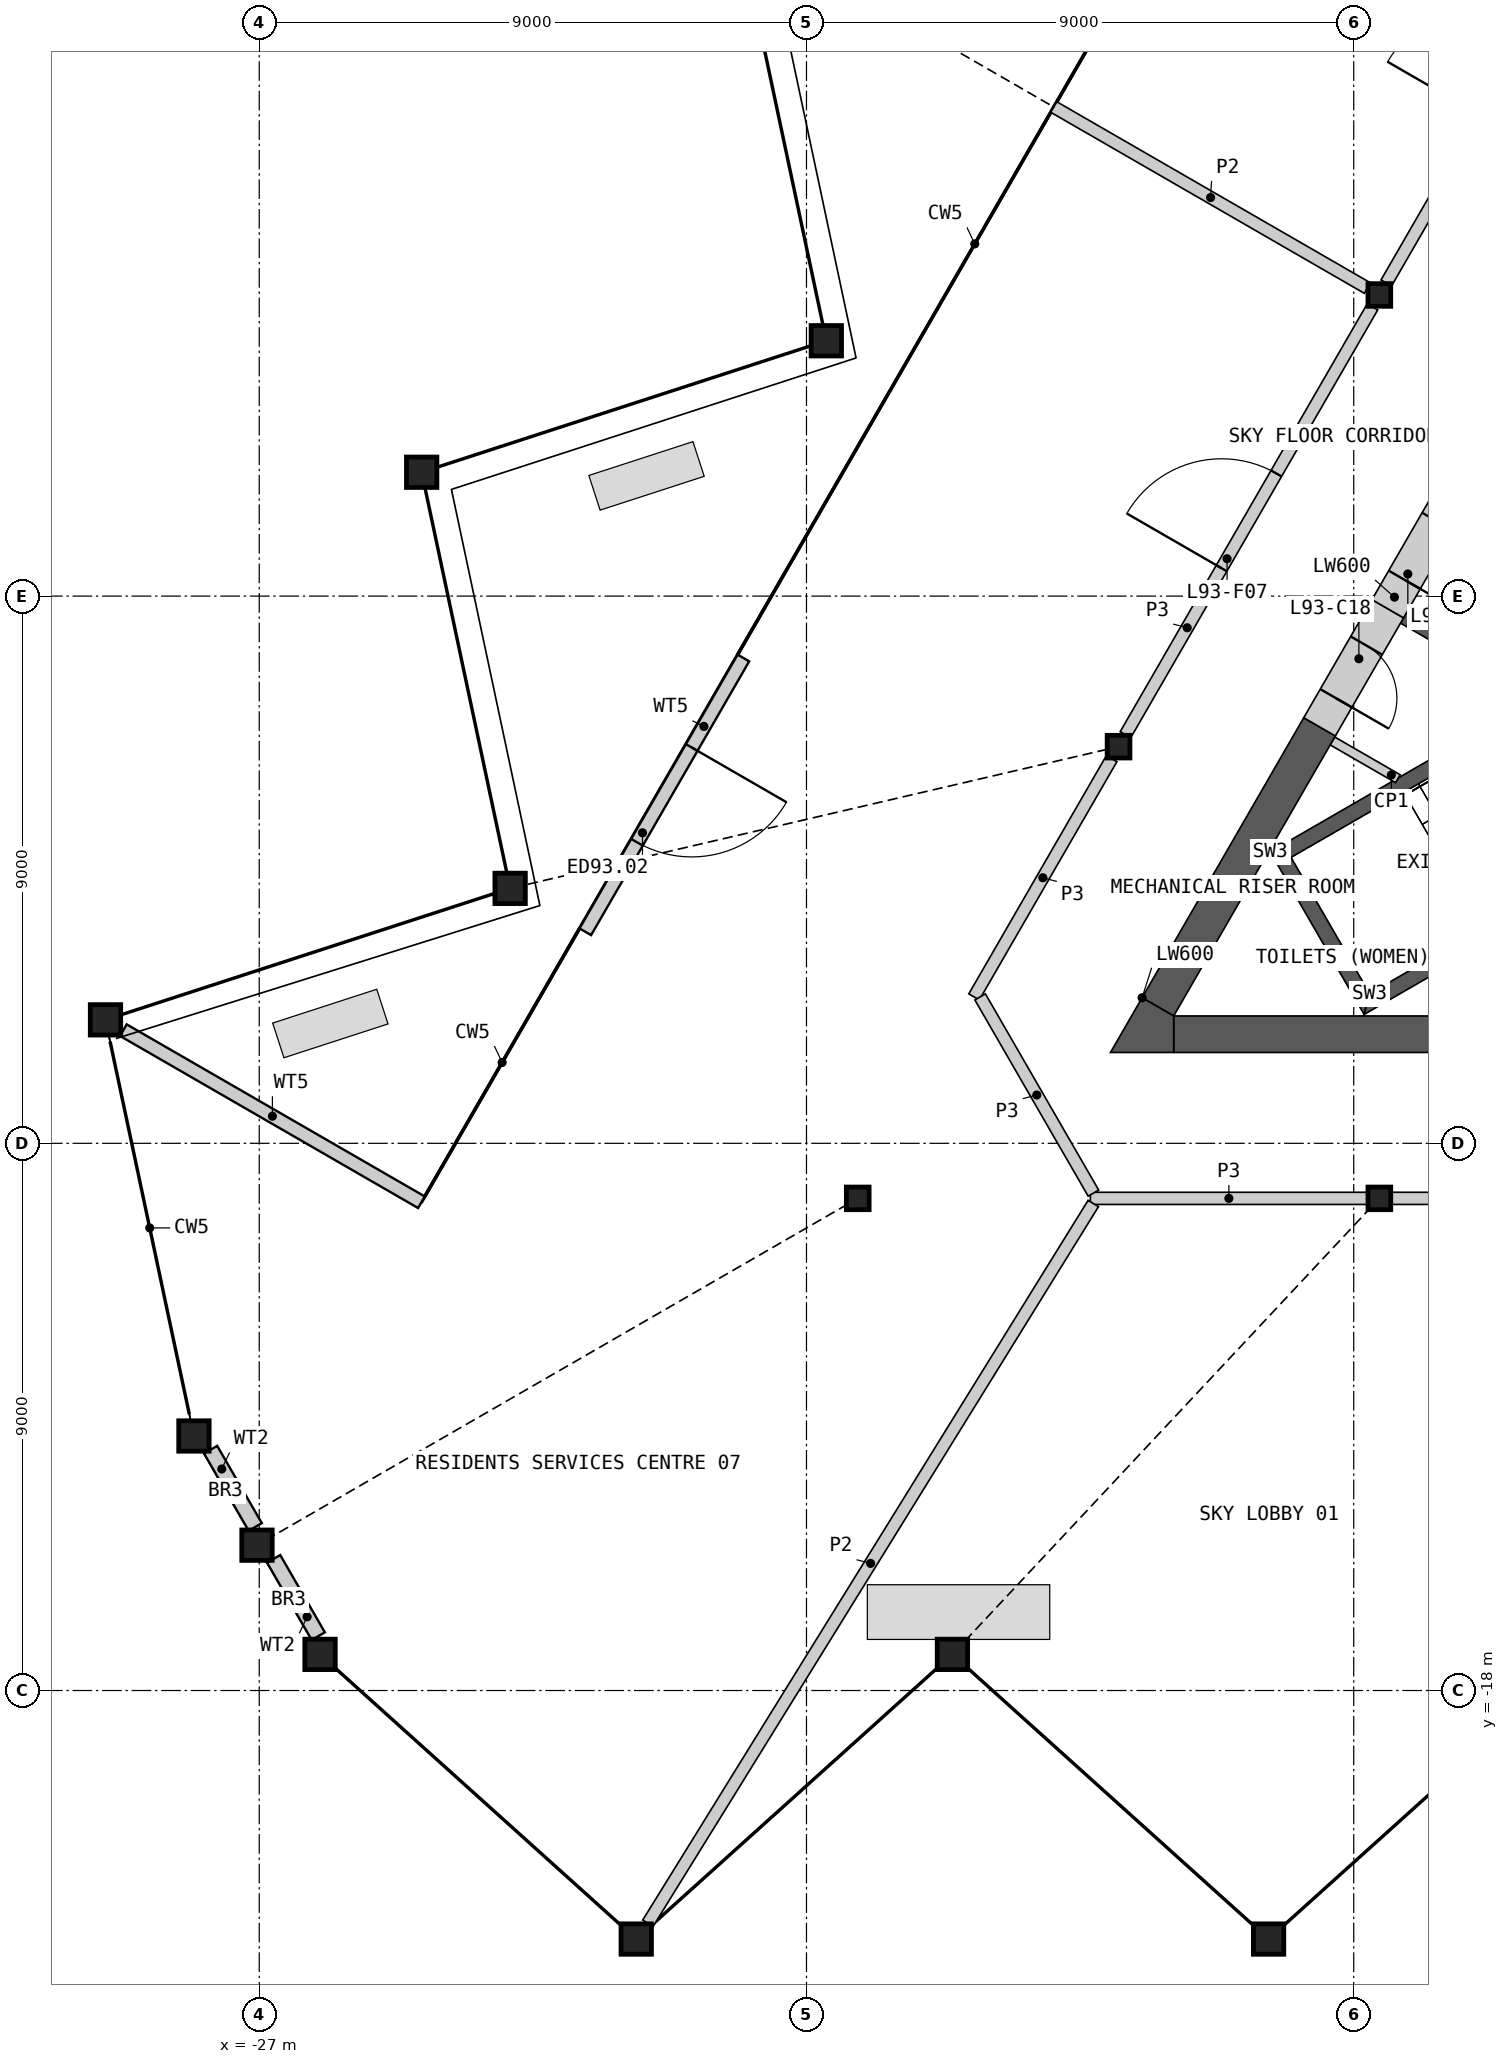
"""IFC4 building model, lengths in metres.
Left out: names, types, materials, properties, quantities, classifications, styles, units other than length and angle.
Written with IfcOpenShell. Run it as: python <this file> out.ifc"""

import sys

from ifc_helpers import new_model, si_unit, direction, frame, frame_2d, origin, origin_2d, place, context, subcontext, project, spatial, polyline, rectangle, hollow_rectangle, i_section, outline, extrude, element, fill, save


model = new_model("IFC4")
c1 = context("Model", 3, precision=1e-05, world=origin(), true_north=direction((0.0, 1.0)))
c2 = subcontext(c1, "Body", "Model", "MODEL_VIEW")
j1 = project(units=[si_unit("LENGTHUNIT", "METRE"), si_unit("PLANEANGLEUNIT", "RADIAN")], contexts=[c1])
p1 = place(None, origin())
s1 = spatial("IfcSite", under=j1, at=p1, CompositionType="ELEMENT")
p2 = place(p1, origin())
s2 = spatial("IfcBuilding", under=s1, at=p2, CompositionType="ELEMENT")
p3 = place(p2, frame((0.0, 0.0, 405.2)))
s3 = spatial("IfcBuildingStorey", under=s2, at=p3, CompositionType="ELEMENT", Elevation=405.2)
for number, where, z_axis, x_axis in (
    (1, (-26.0, -17.406, 0.0), (0.0, 0.0, 1.0), (1.0, 0.0, 0.0)),
    (2, (-20.8, -22.088, 0.0), (0.0, 0.0, 1.0), (1.0, 0.0, 0.0)),
    (3, (-15.6, -17.406, 0.0), (0.0, 0.0, 1.0), (1.0, 0.0, 0.0)),
    (4, (-10.4, -22.088, 0.0), (0.0, 0.0, 1.0), (1.0, 0.0, 0.0)),
    (5, (-17.674, 4.199, 0.0), (0.0, 0.0, 1.0), (1.0, 0.0, 0.0)),
    (6, (-24.329, 2.037, 0.0), (0.0, 0.0, 1.0), (1.0, 0.0, 0.0)),
    (7, (-22.874, -4.807, 0.0), (0.0, 0.0, 1.0), (1.0, 0.0, 0.0)),
    (8, (-29.529, -6.969, 0.0), (0.0, 0.0, 1.0), (1.0, 0.0, 0.0)),
    (9, (-28.074, -13.814, 0.0), (0.0, 0.0, 1.0), (1.0, 0.0, 0.0)),
    (10, (-27.037, -15.61, 0.0), (0.0, 0.0, 1.0), (1.0, 0.0, 0.0)),
):
    element("IfcColumn", number, at=place(p3, frame(where, z_axis=z_axis, x_axis=x_axis)), inside=s3, PredefinedType="COLUMN", context=c2, shape_type="SweptSolid", body=[
        extrude(hollow_rectangle(XDim=0.5, YDim=0.5, WallThickness=0.03, at=origin_2d()), origin(), (0.0, 0.0, 1.0), 10.0),
    ])
for number, where, z_axis, x_axis in (
    (11, (-8.578, 4.953, 0.0), (0.0, 0.0, 1.0), (1.0, 0.0, 0.0)),
    (12, (-12.868, -2.476, 0.0), (0.0, 0.0, 1.0), (1.0, 0.0, 0.0)),
    (13, (-17.157, -9.906, 0.0), (0.0, 0.0, 1.0), (1.0, 0.0, 0.0)),
    (14, (-8.578, -9.906, 0.0), (0.0, 0.0, 1.0), (1.0, 0.0, 0.0)),
):
    element("IfcColumn", number, at=place(p3, frame(where, z_axis=z_axis, x_axis=x_axis)), inside=s3, PredefinedType="COLUMN", context=c2, shape_type="SweptSolid", body=[
        extrude(i_section(OverallWidth=0.374, OverallDepth=0.372, WebThickness=0.016, FlangeThickness=0.026, at=origin_2d()), origin(), (0.0, 0.0, 1.0), 10.0),
    ])
for number, where, z_axis, x_axis in (
    (15, (-27.8, -14.039, 0.0), (0.0, 0.0, 1.0), (0.5, -0.866, 0.0)),
    (16, (-26.763, -15.835, 0.0), (0.0, 0.0, 1.0), (0.5, -0.866, 0.0)),
):
    element("IfcWall", number, at=place(p3, frame(where, z_axis=z_axis, x_axis=x_axis)), inside=s3, PredefinedType="SOLIDWALL", context=c2, shape_type="SweptSolid", body=[
        extrude(rectangle(XDim=1.468, YDim=0.25, at=frame_2d((0.734, 0.0))), origin(), (0.0, 0.0, 1.0), 9.234),
    ])
p4 = place(p3, frame((-19.037, -1.018, 0.0), z_axis=(0.0, 0.0, 1.0), x_axis=(-0.500027264788, -0.866009661879, 0.0)))
e17 = element("IfcWall", 17, at=p4, inside=s3, PredefinedType="SOLIDWALL", context=c2, shape_type="SweptSolid", body=[
    extrude(rectangle(XDim=5.2, YDim=0.22, at=frame_2d((2.6, 0.0))), origin(), (0.0, 0.0, 1.0), 9.234),
])
p5 = place(p4, frame((1.7, 0.0, 0.0)))
e18 = element("IfcOpeningElement", 18, at=p5, cuts=e17, PredefinedType="OPENING", context=c2, shape_type="SweptSolid", body=[
    extrude(rectangle(XDim=1.8, YDim=2.4, at=frame_2d((0.9, 1.2))), frame((0.0, 0.12, 0.0), z_axis=(0.0, -1.0, 0.0), x_axis=(1.0, 0.0, 0.0)), (0.0, 0.0, 1.0), 0.24),
])
p6 = place(p3, frame((-29.235, -7.139, 0.0), z_axis=(0.0, 0.0, 1.0), x_axis=(0.866018233111, -0.500012419765, 0.0)))
e19 = element("IfcWall", 19, at=p6, inside=s3, PredefinedType="SOLIDWALL", context=c2, shape_type="SweptSolid", body=[
    extrude(rectangle(XDim=5.66, YDim=0.22, at=frame_2d((2.83, 0.0))), origin(), (0.0, 0.0, 1.0), 9.234),
])
p7 = place(p3, origin())
e20 = element("IfcWall", 20, at=p7, inside=s3, PredefinedType="SHEAR", context=c2, shape_type="SweptSolid", body=[
    extrude(outline(polyline([(-6.061, -1.697), (-8.231, -0.444), (-8.131, -0.271), (-5.96, -1.524), (-6.061, -1.697)])), origin(), (0.0, 0.0, 1.0), 9.7),
])
p8 = place(p3, origin())
e21 = element("IfcWall", 21, at=p8, inside=s3, PredefinedType="SHEAR", context=c2, shape_type="SweptSolid", body=[
    extrude(outline(polyline([(-5.307, -1.281), (-10.374, -4.206), (-10.032, -4.298), (-5.182, -1.498), (-5.307, -1.281)])), origin(), (0.0, 0.0, 1.0), 9.7),
])
p9 = place(p3, origin())
e22 = element("IfcWall", 22, at=p9, inside=s3, PredefinedType="SHEAR", context=c2, shape_type="SweptSolid", body=[
    extrude(outline(polyline([(-10.374, -4.206), (-8.83, -6.881), (-8.738, -6.539), (-10.032, -4.298), (-10.374, -4.206)])), origin(), (0.0, 0.0, 1.0), 9.7),
])
p10 = place(p3, origin())
e23 = element("IfcWall", 23, at=p10, inside=s3, PredefinedType="SHEAR", context=c2, shape_type="SweptSolid", body=[
    extrude(outline(polyline([(-8.738, -6.539), (-8.83, -6.881), (-3.763, -3.956), (-3.888, -3.739), (-8.738, -6.539)])), origin(), (0.0, 0.0, 1.0), 9.7),
])
p11 = place(p3, frame((-9.35, -2.383, 0.0), z_axis=(0.0, 0.0, 1.0), x_axis=(0.866057962423, -0.499943602543, 0.0)))
e24 = element("IfcWall", 24, at=p11, inside=s3, PredefinedType="PARTITIONING", context=c2, shape_type="SweptSolid", body=[
    extrude(rectangle(XDim=1.242, YDim=0.15, at=frame_2d((0.621, 0.0))), origin(), (0.0, 0.0, 1.0), 9.7),
])
p12 = place(p3, frame((-11.961, -7.206, 0.0), z_axis=(0.0, 0.0, 1.0), x_axis=(1.0, 0.0, 0.0)))
e25 = element("IfcWall", 25, at=p12, inside=s3, PredefinedType="SHEAR", context=c2, shape_type="SweptSolid", body=[
    extrude(rectangle(XDim=4.868, YDim=0.6, at=frame_2d((2.434, 0.0))), origin(), (0.0, 0.0, 1.0), 9.7),
])
p13 = place(p3, frame((-9.562, -2.15, 0.0), z_axis=(0.0, 0.0, 1.0), x_axis=(-0.500015214976, -0.866016619236, 0.0)))
e26 = element("IfcWall", 26, at=p13, inside=s3, PredefinedType="SHEAR", context=c2, shape_type="SweptSolid", body=[
    extrude(rectangle(XDim=5.318, YDim=0.6, at=frame_2d((2.659, 0.0))), origin(), (0.0, 0.0, 1.0), 9.7),
])
p14 = place(p3, origin())
e27 = element("IfcWall", 27, at=p14, inside=s3, PredefinedType="SHEAR", context=c2, shape_type="SweptSolid", body=[
    extrude(outline(polyline([(-12.48, -6.606), (-11.961, -6.906), (-11.961, -7.506), (-13.0, -7.506), (-12.48, -6.606)])), origin(), (0.0, 0.0, 1.0), 9.7),
])
p15 = place(p3, frame((-8.44, -0.208, 0.0), z_axis=(0.0, 0.0, 1.0), x_axis=(-0.500001951578, -0.866024277037, 0.0)))
e28 = element("IfcWall", 28, at=p15, inside=s3, PredefinedType="SHEAR", context=c2, shape_type="SweptSolid", body=[
    extrude(rectangle(XDim=2.243, YDim=0.6, at=frame_2d((1.122, 0.0))), origin(), (0.0, 0.0, 1.0), 9.7),
])
p16 = place(p15, frame((0.7, 0.0, 0.0)))
e29 = element("IfcOpeningElement", 29, at=p16, cuts=e28, PredefinedType="OPENING", context=c2, shape_type="SweptSolid", body=[
    extrude(rectangle(XDim=1.0, YDim=2.1, at=frame_2d((0.5, 1.05))), frame((0.0, 0.31, 0.0), z_axis=(0.0, -1.0, 0.0), x_axis=(1.0, 0.0, 0.0)), (0.0, 0.0, 1.0), 0.62),
])
p17 = place(p3, frame((-7.34, 1.698, 0.0), z_axis=(0.0, 0.0, 1.0), x_axis=(-0.50002983664, -0.866008176907, 0.0)))
e30 = element("IfcWall", 30, at=p17, inside=s3, PredefinedType="SHEAR", context=c2, shape_type="SweptSolid", body=[
    extrude(rectangle(XDim=2.2, YDim=0.6, at=frame_2d((1.1, 0.0))), origin(), (0.0, 0.0, 1.0), 9.7),
])
p18 = place(p17, frame((0.55, 0.0, 0.0)))
e31 = element("IfcOpeningElement", 31, at=p18, cuts=e30, PredefinedType="OPENING", context=c2, shape_type="SweptSolid", body=[
    extrude(rectangle(XDim=1.1, YDim=2.1, at=frame_2d((0.55, 1.05))), frame((0.0, 0.31, 0.0), z_axis=(0.0, -1.0, 0.0), x_axis=(1.0, 0.0, 0.0)), (0.0, 0.0, 1.0), 0.62),
])
p19 = place(p3, frame((-8.382, -9.906, 0.0), z_axis=(0.0, 0.0, 1.0), x_axis=(1.0, 0.0, 0.0)))
e32 = element("IfcWall", 32, at=p19, inside=s3, PredefinedType="PARTITIONING", context=c2, shape_type="SweptSolid", body=[
    extrude(rectangle(XDim=8.185, YDim=0.2, at=frame_2d((4.092, 0.0))), origin(), (0.0, 0.0, 1.0), 9.7),
])
p20 = place(p19, frame((3.192, 0.0, 0.0)))
e33 = element("IfcOpeningElement", 33, at=p20, cuts=e32, PredefinedType="OPENING", context=c2, shape_type="SweptSolid", body=[
    extrude(rectangle(XDim=1.8, YDim=2.1, at=frame_2d((0.9, 1.05))), frame((0.0, 0.11, 0.0), z_axis=(0.0, -1.0, 0.0), x_axis=(1.0, 0.0, 0.0)), (0.0, 0.0, 1.0), 0.22),
])
p21 = place(p3, frame((-8.465, 5.15, 0.0), z_axis=(0.0, 0.0, 1.0), x_axis=(0.499992155518, 0.866029932751, 0.0)))
e34 = element("IfcWall", 34, at=p21, inside=s3, PredefinedType="PARTITIONING", context=c2, shape_type="SweptSolid", body=[
    extrude(rectangle(XDim=8.123, YDim=0.2, at=frame_2d((4.062, 0.0))), origin(), (0.0, 0.0, 1.0), 9.7),
])
p22 = place(p21, frame((3.162, 0.0, 0.0)))
e35 = element("IfcOpeningElement", 35, at=p22, cuts=e34, PredefinedType="OPENING", context=c2, shape_type="SweptSolid", body=[
    extrude(rectangle(XDim=1.8, YDim=2.1, at=frame_2d((0.9, 1.05))), frame((0.0, 0.11, 0.0), z_axis=(0.0, -1.0, 0.0), x_axis=(1.0, 0.0, 0.0)), (0.0, 0.0, 1.0), 0.22),
])
p23 = place(p3, frame((-12.754, -2.279, 0.0), z_axis=(0.0, 0.0, 1.0), x_axis=(0.500001682468, 0.866024432409, 0.0)))
e36 = element("IfcWall", 36, at=p23, inside=s3, PredefinedType="PARTITIONING", context=c2, shape_type="SweptSolid", body=[
    extrude(rectangle(XDim=8.124, YDim=0.2, at=frame_2d((4.062, 0.0))), origin(), (0.0, 0.0, 1.0), 9.7),
])
p24 = place(p23, frame((3.162, 0.0, 0.0)))
e37 = element("IfcOpeningElement", 37, at=p24, cuts=e36, PredefinedType="OPENING", context=c2, shape_type="SweptSolid", body=[
    extrude(rectangle(XDim=1.8, YDim=2.1, at=frame_2d((0.9, 1.05))), frame((0.0, 0.11, 0.0), z_axis=(0.0, -1.0, 0.0), x_axis=(1.0, 0.0, 0.0)), (0.0, 0.0, 1.0), 0.22),
])
p25 = place(p3, frame((-13.331, -9.906, 0.0), z_axis=(0.0, 0.0, 1.0), x_axis=(1.0, 0.0, 0.0)))
e38 = element("IfcWall", 38, at=p25, inside=s3, PredefinedType="PARTITIONING", context=c2, shape_type="SweptSolid", body=[
    extrude(rectangle(XDim=4.555, YDim=0.2, at=frame_2d((2.278, 0.0))), origin(), (0.0, 0.0, 1.0), 9.7),
])
p26 = place(p3, frame((-15.244, -6.592, 0.0), z_axis=(0.0, 0.0, 1.0), x_axis=(0.499974648164, 0.866040040179, 0.0)))
e39 = element("IfcWall", 39, at=p26, inside=s3, PredefinedType="PARTITIONING", context=c2, shape_type="SweptSolid", body=[
    extrude(rectangle(XDim=4.525, YDim=0.2, at=frame_2d((2.263, 0.0))), origin(), (0.0, 0.0, 1.0), 9.7),
])
p27 = place(p3, frame((-15.144, -6.592, 0.0), z_axis=(0.0, 0.0, 1.0), x_axis=(0.499958791762, -0.866049194065, 0.0)))
e40 = element("IfcWall", 40, at=p27, inside=s3, PredefinedType="PARTITIONING", context=c2, shape_type="SweptSolid", body=[
    extrude(rectangle(XDim=3.726, YDim=0.2, at=frame_2d((1.863, 0.0))), origin(), (0.0, 0.0, 1.0), 9.7),
])
p28 = place(p3, frame((-20.608, -21.828, 0.0), z_axis=(0.0, 0.0, 1.0), x_axis=(0.526187960676, 0.850368290825, 0.0)))
e41 = element("IfcWall", 41, at=p28, inside=s3, PredefinedType="PARTITIONING", context=c2, shape_type="SweptSolid", body=[
    extrude(rectangle(XDim=13.92, YDim=0.2, at=frame_2d((6.96, 0.0))), origin(), (0.0, 0.0, 1.0), 8.93),
])
p29 = place(p3, frame((-13.933, 8.044, 0.0), z_axis=(0.0, 0.0, 1.0), x_axis=(0.866024464444, -0.500001626982, 0.0)))
e42 = element("IfcWall", 42, at=p29, inside=s3, PredefinedType="PARTITIONING", context=c2, shape_type="SweptSolid", body=[
    extrude(rectangle(XDim=5.955, YDim=0.2, at=frame_2d((2.978, 0.0))), origin(), (0.0, 0.0, 1.0), 8.93),
])
p30 = place(p5, origin())
e43 = element("IfcDoor", 43, at=p30, inside=s3, OperationType="DOUBLE_DOOR_SINGLE_SWING", PredefinedType="DOOR", context=c2, shape_type="SweptSolid", body=[
    extrude(rectangle(XDim=1.8, YDim=2.4, at=frame_2d((0.9, 1.2))), frame((0.0, 0.025, 0.0), z_axis=(0.0, -1.0, 0.0), x_axis=(1.0, 0.0, 0.0)), (0.0, 0.0, 1.0), 0.05),
])
fill(e18, e43)
p31 = place(p16, origin())
e44 = element("IfcDoor", 44, at=p31, inside=s3, OperationType="SINGLE_SWING_RIGHT", PredefinedType="DOOR", context=c2, shape_type="SweptSolid", body=[
    extrude(rectangle(XDim=1.0, YDim=2.1, at=frame_2d((0.5, 1.05))), frame((0.0, 0.055, 0.0), z_axis=(0.0, -1.0, 0.0), x_axis=(1.0, 0.0, 0.0)), (0.0, 0.0, 1.0), 0.05),
])
fill(e29, e44)
p32 = place(p18, origin())
e45 = element("IfcDoor", 45, at=p32, inside=s3, OperationType="SINGLE_SWING_RIGHT", PredefinedType="DOOR", context=c2, shape_type="SweptSolid", body=[
    extrude(rectangle(XDim=1.1, YDim=2.1, at=frame_2d((0.55, 1.05))), frame((0.0, 0.055, 0.0), z_axis=(0.0, -1.0, 0.0), x_axis=(1.0, 0.0, 0.0)), (0.0, 0.0, 1.0), 0.05),
])
fill(e31, e45)
p33 = place(p24, origin())
e46 = element("IfcDoor", 46, at=p33, inside=s3, OperationType="DOUBLE_DOOR_SINGLE_SWING", PredefinedType="DOOR", context=c2, shape_type="SweptSolid", body=[
    extrude(rectangle(XDim=1.8, YDim=2.1, at=frame_2d((0.9, 1.05))), frame((0.0, 0.025, 0.0), z_axis=(0.0, -1.0, 0.0), x_axis=(1.0, 0.0, 0.0)), (0.0, 0.0, 1.0), 0.05),
])
fill(e37, e46)
save(model, sys.argv[1])
